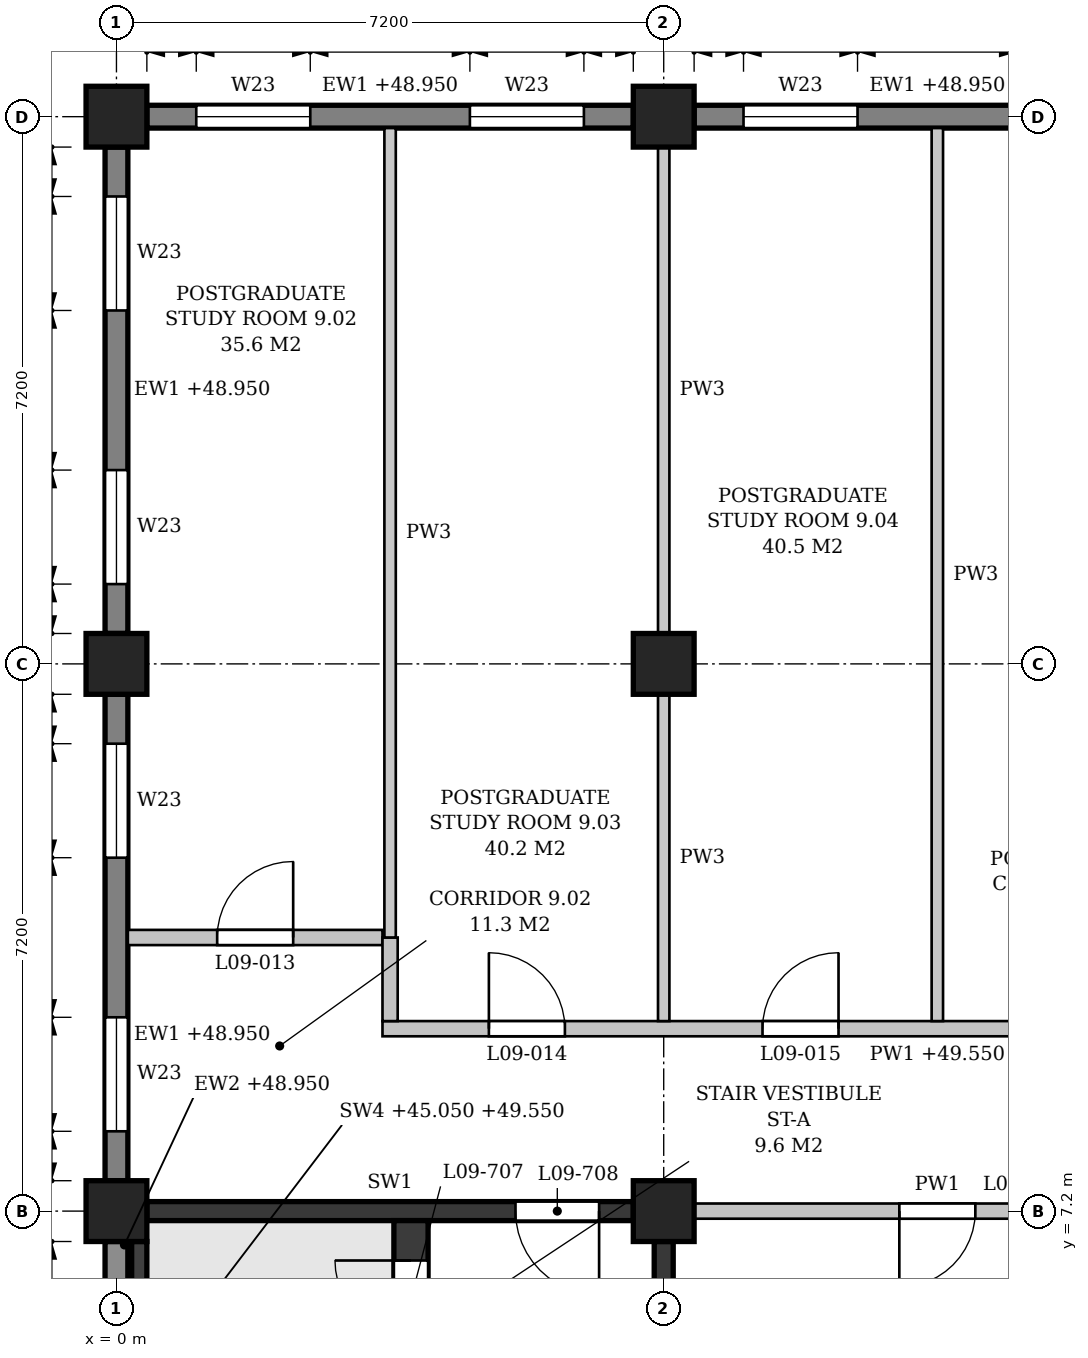
"""IFC4 building model, lengths in metres.
Left out: names, types, materials, properties, quantities, classifications, styles, units other than length and angle.
Written with IfcOpenShell. Run it as: python <this file> out.ifc"""

import sys

from ifc_helpers import new_model, si_unit, direction, frame, frame_2d, origin, origin_2d, place, context, subcontext, project, spatial, polyline, rectangle, outline, extrude, element, fill, save


model = new_model("IFC4")
c1 = context("Model", 3, precision=1e-05, world=origin(), true_north=direction((0.0, 1.0)))
c2 = subcontext(c1, "Body", "Model", "MODEL_VIEW")
j1 = project(units=[si_unit("LENGTHUNIT", "METRE"), si_unit("PLANEANGLEUNIT", "RADIAN")], contexts=[c1])
p1 = place(None, origin())
s1 = spatial("IfcSite", under=j1, at=p1, CompositionType="ELEMENT")
p2 = place(p1, origin())
s2 = spatial("IfcBuilding", under=s1, at=p2, CompositionType="ELEMENT")
p3 = place(p2, frame((0.0, 0.0, 45.3)))
s3 = spatial("IfcBuildingStorey", under=s2, at=p3, CompositionType="ELEMENT", Elevation=45.3)
for number, where, z_axis, x_axis in (
    (1, (0.0, 7.2, 0.0), (0.0, 0.0, 1.0), (1.0, 0.0, 0.0)),
    (2, (0.0, 14.4, 0.0), (0.0, 0.0, 1.0), (1.0, 0.0, 0.0)),
    (3, (0.0, 21.6, 0.0), (0.0, 0.0, 1.0), (1.0, 0.0, 0.0)),
    (4, (7.2, 7.2, 0.0), (0.0, 0.0, 1.0), (1.0, 0.0, 0.0)),
    (5, (7.2, 14.4, 0.0), (0.0, 0.0, 1.0), (1.0, 0.0, 0.0)),
    (6, (7.2, 21.6, 0.0), (0.0, 0.0, 1.0), (1.0, 0.0, 0.0)),
):
    element("IfcColumn", number, at=place(p3, frame(where, z_axis=z_axis, x_axis=x_axis)), inside=s3, PredefinedType="COLUMN", context=c2, shape_type="SweptSolid", body=[
        extrude(rectangle(XDim=0.8, YDim=0.8, at=origin_2d()), origin(), (0.0, 0.0, 1.0), 4.5),
    ])
p4 = place(p3, frame((0.0, 0.4, 0.0), z_axis=(0.0, 0.0, 1.0), x_axis=(0.0, 1.0, 0.0)))
e7 = element("IfcWall", 7, at=p4, inside=s3, PredefinedType="STANDARD", context=c2, shape_type="SweptSolid", body=[
    extrude(rectangle(XDim=6.4, YDim=0.3, at=frame_2d((3.2, 0.0))), origin(), (0.0, 0.0, 1.0), 3.65),
])
p5 = place(p4, frame((0.95, 0.0, 0.9)))
e8 = element("IfcOpeningElement", 8, at=p5, cuts=e7, PredefinedType="OPENING", context=c2, shape_type="SweptSolid", body=[
    extrude(outline(polyline([(0.0, 0.0), (0.9, 0.0), (0.9, 2.25), (0.45, 2.7), (0.0, 2.25), (0.0, 0.0)])), frame((0.0, 0.16, 0.0), z_axis=(0.0, -1.0, 0.0), x_axis=(1.0, 0.0, 0.0)), (0.0, 0.0, 1.0), 0.32),
])
p6 = place(p4, frame((4.55, 0.0, 0.9)))
e9 = element("IfcOpeningElement", 9, at=p6, cuts=e7, PredefinedType="OPENING", context=c2, shape_type="SweptSolid", body=[
    extrude(outline(polyline([(0.0, 0.0), (0.9, 0.0), (0.9, 2.25), (0.45, 2.7), (0.0, 2.25), (0.0, 0.0)])), frame((0.0, 0.16, 0.0), z_axis=(0.0, -1.0, 0.0), x_axis=(1.0, 0.0, 0.0)), (0.0, 0.0, 1.0), 0.32),
])
p7 = place(p3, frame((0.0, 7.6, 0.0), z_axis=(0.0, 0.0, 1.0), x_axis=(0.0, 1.0, 0.0)))
e10 = element("IfcWall", 10, at=p7, inside=s3, PredefinedType="STANDARD", context=c2, shape_type="SweptSolid", body=[
    extrude(rectangle(XDim=6.4, YDim=0.3, at=frame_2d((3.2, 0.0))), origin(), (0.0, 0.0, 1.0), 3.65),
])
p8 = place(p7, frame((0.65, 0.0, 0.9)))
e11 = element("IfcOpeningElement", 11, at=p8, cuts=e10, PredefinedType="OPENING", context=c2, shape_type="SweptSolid", body=[
    extrude(outline(polyline([(0.0, 0.0), (1.5, 0.0), (1.5, 1.95), (0.75, 2.7), (0.0, 1.95), (0.0, 0.0)])), frame((0.0, 0.16, 0.0), z_axis=(0.0, -1.0, 0.0), x_axis=(1.0, 0.0, 0.0)), (0.0, 0.0, 1.0), 0.32),
])
p9 = place(p7, frame((4.25, 0.0, 0.9)))
e12 = element("IfcOpeningElement", 12, at=p9, cuts=e10, PredefinedType="OPENING", context=c2, shape_type="SweptSolid", body=[
    extrude(outline(polyline([(0.0, 0.0), (1.5, 0.0), (1.5, 1.95), (0.75, 2.7), (0.0, 1.95), (0.0, 0.0)])), frame((0.0, 0.16, 0.0), z_axis=(0.0, -1.0, 0.0), x_axis=(1.0, 0.0, 0.0)), (0.0, 0.0, 1.0), 0.32),
])
p10 = place(p3, frame((0.0, 14.8, 0.0), z_axis=(0.0, 0.0, 1.0), x_axis=(0.0, 1.0, 0.0)))
e13 = element("IfcWall", 13, at=p10, inside=s3, PredefinedType="STANDARD", context=c2, shape_type="SweptSolid", body=[
    extrude(rectangle(XDim=6.4, YDim=0.3, at=frame_2d((3.2, 0.0))), origin(), (0.0, 0.0, 1.0), 3.65),
])
p11 = place(p10, frame((0.65, 0.0, 0.9)))
e14 = element("IfcOpeningElement", 14, at=p11, cuts=e13, PredefinedType="OPENING", context=c2, shape_type="SweptSolid", body=[
    extrude(outline(polyline([(0.0, 0.0), (1.5, 0.0), (1.5, 1.95), (0.75, 2.7), (0.0, 1.95), (0.0, 0.0)])), frame((0.0, 0.16, 0.0), z_axis=(0.0, -1.0, 0.0), x_axis=(1.0, 0.0, 0.0)), (0.0, 0.0, 1.0), 0.32),
])
p12 = place(p10, frame((4.25, 0.0, 0.9)))
e15 = element("IfcOpeningElement", 15, at=p12, cuts=e13, PredefinedType="OPENING", context=c2, shape_type="SweptSolid", body=[
    extrude(outline(polyline([(0.0, 0.0), (1.5, 0.0), (1.5, 1.95), (0.75, 2.7), (0.0, 1.95), (0.0, 0.0)])), frame((0.0, 0.16, 0.0), z_axis=(0.0, -1.0, 0.0), x_axis=(1.0, 0.0, 0.0)), (0.0, 0.0, 1.0), 0.32),
])
p13 = place(p3, frame((14.0, 21.6, 0.0), z_axis=(0.0, 0.0, 1.0), x_axis=(-1.0, 0.0, 0.0)))
e16 = element("IfcWall", 16, at=p13, inside=s3, PredefinedType="STANDARD", context=c2, shape_type="SweptSolid", body=[
    extrude(rectangle(XDim=6.4, YDim=0.3, at=frame_2d((3.2, 0.0))), origin(), (0.0, 0.0, 1.0), 3.65),
])
p14 = place(p13, frame((0.65, 0.0, 0.9)))
e17 = element("IfcOpeningElement", 17, at=p14, cuts=e16, PredefinedType="OPENING", context=c2, shape_type="SweptSolid", body=[
    extrude(outline(polyline([(0.0, 0.0), (1.5, 0.0), (1.5, 1.95), (0.75, 2.7), (0.0, 1.95), (0.0, 0.0)])), frame((0.0, 0.16, 0.0), z_axis=(0.0, -1.0, 0.0), x_axis=(1.0, 0.0, 0.0)), (0.0, 0.0, 1.0), 0.32),
])
p15 = place(p13, frame((4.25, 0.0, 0.9)))
e18 = element("IfcOpeningElement", 18, at=p15, cuts=e16, PredefinedType="OPENING", context=c2, shape_type="SweptSolid", body=[
    extrude(outline(polyline([(0.0, 0.0), (1.5, 0.0), (1.5, 1.95), (0.75, 2.7), (0.0, 1.95), (0.0, 0.0)])), frame((0.0, 0.16, 0.0), z_axis=(0.0, -1.0, 0.0), x_axis=(1.0, 0.0, 0.0)), (0.0, 0.0, 1.0), 0.32),
])
p16 = place(p3, frame((6.8, 21.6, 0.0), z_axis=(0.0, 0.0, 1.0), x_axis=(-1.0, 0.0, 0.0)))
e19 = element("IfcWall", 19, at=p16, inside=s3, PredefinedType="STANDARD", context=c2, shape_type="SweptSolid", body=[
    extrude(rectangle(XDim=6.4, YDim=0.3, at=frame_2d((3.2, 0.0))), origin(), (0.0, 0.0, 1.0), 3.65),
])
p17 = place(p16, frame((0.65, 0.0, 0.9)))
e20 = element("IfcOpeningElement", 20, at=p17, cuts=e19, PredefinedType="OPENING", context=c2, shape_type="SweptSolid", body=[
    extrude(outline(polyline([(0.0, 0.0), (1.5, 0.0), (1.5, 1.95), (0.75, 2.7), (0.0, 1.95), (0.0, 0.0)])), frame((0.0, 0.16, 0.0), z_axis=(0.0, -1.0, 0.0), x_axis=(1.0, 0.0, 0.0)), (0.0, 0.0, 1.0), 0.32),
])
p18 = place(p16, frame((4.25, 0.0, 0.9)))
e21 = element("IfcOpeningElement", 21, at=p18, cuts=e19, PredefinedType="OPENING", context=c2, shape_type="SweptSolid", body=[
    extrude(outline(polyline([(0.0, 0.0), (1.5, 0.0), (1.5, 1.95), (0.75, 2.7), (0.0, 1.95), (0.0, 0.0)])), frame((0.0, 0.16, 0.0), z_axis=(0.0, -1.0, 0.0), x_axis=(1.0, 0.0, 0.0)), (0.0, 0.0, 1.0), 0.32),
])
p19 = place(p3, frame((0.4, 7.2, 0.0), z_axis=(0.0, 0.0, 1.0), x_axis=(1.0, 0.0, 0.0)))
e22 = element("IfcWall", 22, at=p19, inside=s3, PredefinedType="SHEAR", context=c2, shape_type="SweptSolid", body=[
    extrude(rectangle(XDim=6.4, YDim=0.25, at=frame_2d((3.2, 0.0))), origin(), (0.0, 0.0, 1.0), 3.55),
])
p20 = place(p19, frame((4.85, 0.0, 0.0)))
e23 = element("IfcOpeningElement", 23, at=p20, cuts=e22, PredefinedType="OPENING", context=c2, shape_type="SweptSolid", body=[
    extrude(rectangle(XDim=1.1, YDim=2.1, at=frame_2d((0.55, 1.05))), frame((0.0, 0.135, 0.0), z_axis=(0.0, -1.0, 0.0), x_axis=(1.0, 0.0, 0.0)), (0.0, 0.0, 1.0), 0.27),
])
p21 = place(p3, frame((7.2, 0.4, 0.0), z_axis=(0.0, 0.0, 1.0), x_axis=(0.0, 1.0, 0.0)))
e24 = element("IfcWall", 24, at=p21, inside=s3, PredefinedType="SHEAR", context=c2, shape_type="SweptSolid", body=[
    extrude(rectangle(XDim=6.4, YDim=0.25, at=frame_2d((3.2, 0.0))), origin(), (0.0, 0.0, 1.0), 3.55),
])
p22 = place(p3, frame((0.3, 5.85, -0.25), z_axis=(0.0, 0.0, 1.0), x_axis=(0.0, 1.0, 0.0)))
e25 = element("IfcWall", 25, at=p22, inside=s3, PredefinedType="SHEAR", context=c2, shape_type="SweptSolid", body=[
    extrude(rectangle(XDim=0.95, YDim=0.2, at=frame_2d((0.475, 0.0))), origin(), (0.0, 0.0, 1.0), 4.5),
])
p23 = place(p3, frame((3.875, 0.15, 0.0), z_axis=(0.0, 0.0, 1.0), x_axis=(0.0, 1.0, 0.0)))
e26 = element("IfcWall", 26, at=p23, inside=s3, PredefinedType="SHEAR", context=c2, shape_type="SweptSolid", body=[
    extrude(rectangle(XDim=6.925, YDim=0.45, at=frame_2d((3.462, 0.0))), origin(), (0.0, 0.0, 1.0), 4.25),
])
p24 = place(p23, frame((5.4, 0.0, 0.0)))
e27 = element("IfcOpeningElement", 27, at=p24, cuts=e26, PredefinedType="OPENING", context=c2, shape_type="SweptSolid", body=[
    extrude(rectangle(XDim=1.0, YDim=2.1, at=frame_2d((0.5, 1.05))), frame((0.0, 0.235, 0.0), z_axis=(0.0, -1.0, 0.0), x_axis=(1.0, 0.0, 0.0)), (0.0, 0.0, 1.0), 0.47),
])
p25 = place(p3, frame((7.6, 7.2, 0.0), z_axis=(0.0, 0.0, 1.0), x_axis=(1.0, 0.0, 0.0)))
e28 = element("IfcWall", 28, at=p25, inside=s3, PredefinedType="PARTITIONING", context=c2, shape_type="SweptSolid", body=[
    extrude(rectangle(XDim=6.4, YDim=0.2, at=frame_2d((3.2, 0.0))), origin(), (0.0, 0.0, 1.0), 3.55),
])
p26 = place(p25, frame((2.7, 0.0, 0.0)))
e29 = element("IfcOpeningElement", 29, at=p26, cuts=e28, PredefinedType="OPENING", context=c2, shape_type="SweptSolid", body=[
    extrude(rectangle(XDim=1.0, YDim=2.1, at=frame_2d((0.5, 1.05))), frame((0.0, 0.11, 0.0), z_axis=(0.0, -1.0, 0.0), x_axis=(1.0, 0.0, 0.0)), (0.0, 0.0, 1.0), 0.22),
])
p27 = place(p3, frame((3.5, 9.6, 0.0), z_axis=(0.0, 0.0, 1.0), x_axis=(1.0, 0.0, 0.0)))
e30 = element("IfcWall", 30, at=p27, inside=s3, PredefinedType="PARTITIONING", context=c2, shape_type="SweptSolid", body=[
    extrude(outline(polyline([(0.0, 0.0), (14.6, 0.0), (14.6, 4.25), (11.125, 4.25), (11.125, 3.55), (10.675, 3.55), (10.675, 4.25), (3.925, 4.25), (3.925, 3.55), (3.475, 3.55), (3.475, 4.25), (0.0, 4.25), (0.0, 0.0)])), frame((0.0, 0.1, 0.0), z_axis=(0.0, -1.0, 0.0), x_axis=(1.0, 0.0, 0.0)), (0.0, 0.0, 1.0), 0.2),
])
p28 = place(p27, frame((1.4, 0.0, 0.0)))
e31 = element("IfcOpeningElement", 31, at=p28, cuts=e30, PredefinedType="OPENING", context=c2, shape_type="SweptSolid", body=[
    extrude(rectangle(XDim=1.0, YDim=2.1, at=frame_2d((0.5, 1.05))), frame((0.0, 0.11, 0.0), z_axis=(0.0, -1.0, 0.0), x_axis=(1.0, 0.0, 0.0)), (0.0, 0.0, 1.0), 0.22),
])
p29 = place(p27, frame((5.0, 0.0, 0.0)))
e32 = element("IfcOpeningElement", 32, at=p29, cuts=e30, PredefinedType="OPENING", context=c2, shape_type="SweptSolid", body=[
    extrude(rectangle(XDim=1.0, YDim=2.1, at=frame_2d((0.5, 1.05))), frame((0.0, 0.11, 0.0), z_axis=(0.0, -1.0, 0.0), x_axis=(1.0, 0.0, 0.0)), (0.0, 0.0, 1.0), 0.22),
])
p30 = place(p3, frame((0.15, 10.8, 0.0), z_axis=(0.0, 0.0, 1.0), x_axis=(1.0, 0.0, 0.0)))
e33 = element("IfcWall", 33, at=p30, inside=s3, PredefinedType="PARTITIONING", context=c2, shape_type="SweptSolid", body=[
    extrude(outline(polyline([(0.0, 0.0), (3.35, 0.0), (3.35, 4.25), (0.05, 4.25), (0.05, 3.65), (0.0, 3.65), (0.0, 0.0)])), frame((0.0, 0.1, 0.0), z_axis=(0.0, -1.0, 0.0), x_axis=(1.0, 0.0, 0.0)), (0.0, 0.0, 1.0), 0.2),
])
p31 = place(p30, frame((1.175, 0.0, 0.0)))
e34 = element("IfcOpeningElement", 34, at=p31, cuts=e33, PredefinedType="OPENING", context=c2, shape_type="SweptSolid", body=[
    extrude(rectangle(XDim=1.0, YDim=2.1, at=frame_2d((0.5, 1.05))), frame((0.0, 0.11, 0.0), z_axis=(0.0, -1.0, 0.0), x_axis=(1.0, 0.0, 0.0)), (0.0, 0.0, 1.0), 0.22),
])
p32 = place(p3, frame((3.6, 9.7, 0.0), z_axis=(0.0, 0.0, 1.0), x_axis=(0.0, 1.0, 0.0)))
e35 = element("IfcWall", 35, at=p32, inside=s3, PredefinedType="PARTITIONING", context=c2, shape_type="SweptSolid", body=[
    extrude(rectangle(XDim=1.1, YDim=0.2, at=frame_2d((0.55, 0.0))), origin(), (0.0, 0.0, 1.0), 4.25),
])
p33 = place(p3, frame((3.6, 10.8, 0.0), z_axis=(0.0, 0.0, 1.0), x_axis=(0.0, 1.0, 0.0)))
e36 = element("IfcWall", 36, at=p33, inside=s3, PredefinedType="PARTITIONING", context=c2, shape_type="SweptSolid", body=[
    extrude(rectangle(XDim=10.65, YDim=0.15, at=frame_2d((5.325, 0.0))), origin(), (0.0, 0.0, 1.0), 3.55),
])
p34 = place(p3, frame((7.2, 9.7, 0.0), z_axis=(0.0, 0.0, 1.0), x_axis=(0.0, 1.0, 0.0)))
e37 = element("IfcWall", 37, at=p34, inside=s3, PredefinedType="PARTITIONING", context=c2, shape_type="SweptSolid", body=[
    extrude(rectangle(XDim=4.3, YDim=0.15, at=frame_2d((2.15, 0.0))), origin(), (0.0, 0.0, 1.0), 3.55),
])
p35 = place(p3, frame((7.2, 14.8, 0.0), z_axis=(0.0, 0.0, 1.0), x_axis=(0.0, 1.0, 0.0)))
e38 = element("IfcWall", 38, at=p35, inside=s3, PredefinedType="PARTITIONING", context=c2, shape_type="SweptSolid", body=[
    extrude(rectangle(XDim=6.4, YDim=0.15, at=frame_2d((3.2, 0.0))), origin(), (0.0, 0.0, 1.0), 3.55),
])
p36 = place(p3, frame((10.8, 9.7, 0.0), z_axis=(0.0, 0.0, 1.0), x_axis=(0.0, 1.0, 0.0)))
e39 = element("IfcWall", 39, at=p36, inside=s3, PredefinedType="PARTITIONING", context=c2, shape_type="SweptSolid", body=[
    extrude(rectangle(XDim=11.75, YDim=0.15, at=frame_2d((5.875, 0.0))), origin(), (0.0, 0.0, 1.0), 3.55),
])
p37 = place(p15, origin())
e40 = element("IfcWindow", 40, at=p37, inside=s3, PartitioningType="SINGLE_PANEL", PredefinedType="WINDOW", context=c2, shape_type="SweptSolid", body=[
    extrude(outline(polyline([(0.0, 0.0), (1.5, 0.0), (1.5, 1.95), (0.75, 2.7), (0.0, 1.95), (0.0, 0.0)])), frame((0.0, 0.03, 0.0), z_axis=(0.0, -1.0, 0.0), x_axis=(1.0, 0.0, 0.0)), (0.0, 0.0, 1.0), 0.06),
])
fill(e18, e40)
p38 = place(p17, origin())
e41 = element("IfcWindow", 41, at=p38, inside=s3, PartitioningType="SINGLE_PANEL", PredefinedType="WINDOW", context=c2, shape_type="SweptSolid", body=[
    extrude(outline(polyline([(0.0, 0.0), (1.5, 0.0), (1.5, 1.95), (0.75, 2.7), (0.0, 1.95), (0.0, 0.0)])), frame((0.0, 0.03, 0.0), z_axis=(0.0, -1.0, 0.0), x_axis=(1.0, 0.0, 0.0)), (0.0, 0.0, 1.0), 0.06),
])
fill(e20, e41)
p39 = place(p18, origin())
e42 = element("IfcWindow", 42, at=p39, inside=s3, PartitioningType="SINGLE_PANEL", PredefinedType="WINDOW", context=c2, shape_type="SweptSolid", body=[
    extrude(outline(polyline([(0.0, 0.0), (1.5, 0.0), (1.5, 1.95), (0.75, 2.7), (0.0, 1.95), (0.0, 0.0)])), frame((0.0, 0.03, 0.0), z_axis=(0.0, -1.0, 0.0), x_axis=(1.0, 0.0, 0.0)), (0.0, 0.0, 1.0), 0.06),
])
fill(e21, e42)
p40 = place(p8, origin())
e43 = element("IfcWindow", 43, at=p40, inside=s3, PartitioningType="SINGLE_PANEL", PredefinedType="WINDOW", context=c2, shape_type="SweptSolid", body=[
    extrude(outline(polyline([(0.0, 0.0), (1.5, 0.0), (1.5, 1.95), (0.75, 2.7), (0.0, 1.95), (0.0, 0.0)])), frame((0.0, 0.03, 0.0), z_axis=(0.0, -1.0, 0.0), x_axis=(1.0, 0.0, 0.0)), (0.0, 0.0, 1.0), 0.06),
])
fill(e11, e43)
p41 = place(p9, origin())
e44 = element("IfcWindow", 44, at=p41, inside=s3, PartitioningType="SINGLE_PANEL", PredefinedType="WINDOW", context=c2, shape_type="SweptSolid", body=[
    extrude(outline(polyline([(0.0, 0.0), (1.5, 0.0), (1.5, 1.95), (0.75, 2.7), (0.0, 1.95), (0.0, 0.0)])), frame((0.0, 0.03, 0.0), z_axis=(0.0, -1.0, 0.0), x_axis=(1.0, 0.0, 0.0)), (0.0, 0.0, 1.0), 0.06),
])
fill(e12, e44)
p42 = place(p11, origin())
e45 = element("IfcWindow", 45, at=p42, inside=s3, PartitioningType="SINGLE_PANEL", PredefinedType="WINDOW", context=c2, shape_type="SweptSolid", body=[
    extrude(outline(polyline([(0.0, 0.0), (1.5, 0.0), (1.5, 1.95), (0.75, 2.7), (0.0, 1.95), (0.0, 0.0)])), frame((0.0, 0.03, 0.0), z_axis=(0.0, -1.0, 0.0), x_axis=(1.0, 0.0, 0.0)), (0.0, 0.0, 1.0), 0.06),
])
fill(e14, e45)
p43 = place(p12, origin())
e46 = element("IfcWindow", 46, at=p43, inside=s3, PartitioningType="SINGLE_PANEL", PredefinedType="WINDOW", context=c2, shape_type="SweptSolid", body=[
    extrude(outline(polyline([(0.0, 0.0), (1.5, 0.0), (1.5, 1.95), (0.75, 2.7), (0.0, 1.95), (0.0, 0.0)])), frame((0.0, 0.03, 0.0), z_axis=(0.0, -1.0, 0.0), x_axis=(1.0, 0.0, 0.0)), (0.0, 0.0, 1.0), 0.06),
])
fill(e15, e46)
p44 = place(p24, origin())
e47 = element("IfcDoor", 47, at=p44, inside=s3, OperationType="SINGLE_SWING_RIGHT", PredefinedType="DOOR", context=c2, shape_type="SweptSolid", body=[
    extrude(rectangle(XDim=1.0, YDim=2.1, at=frame_2d((0.5, 1.05))), frame((0.0, 0.025, 0.0), z_axis=(0.0, -1.0, 0.0), x_axis=(1.0, 0.0, 0.0)), (0.0, 0.0, 1.0), 0.05),
])
fill(e27, e47)
p45 = place(p20, frame((1.1, 0.0, 0.0), z_axis=(0.0, 0.0, 1.0), x_axis=(-1.0, 0.0, 0.0)))
e48 = element("IfcDoor", 48, at=p45, inside=s3, OperationType="SINGLE_SWING_LEFT", PredefinedType="DOOR", context=c2, shape_type="SweptSolid", body=[
    extrude(rectangle(XDim=1.1, YDim=2.1, at=frame_2d((0.55, 1.05))), frame((0.0, 0.025, 0.0), z_axis=(0.0, -1.0, 0.0), x_axis=(1.0, 0.0, 0.0)), (0.0, 0.0, 1.0), 0.05),
])
fill(e23, e48)
p46 = place(p26, frame((1.0, 0.0, 0.0), z_axis=(0.0, 0.0, 1.0), x_axis=(-1.0, 0.0, 0.0)))
e49 = element("IfcDoor", 49, at=p46, inside=s3, OperationType="SINGLE_SWING_RIGHT", PredefinedType="DOOR", context=c2, shape_type="SweptSolid", body=[
    extrude(rectangle(XDim=1.0, YDim=2.1, at=frame_2d((0.5, 1.05))), frame((0.0, 0.025, 0.0), z_axis=(0.0, -1.0, 0.0), x_axis=(1.0, 0.0, 0.0)), (0.0, 0.0, 1.0), 0.05),
])
fill(e29, e49)
p47 = place(p31, origin())
e50 = element("IfcDoor", 50, at=p47, inside=s3, OperationType="SINGLE_SWING_RIGHT", PredefinedType="DOOR", context=c2, shape_type="SweptSolid", body=[
    extrude(rectangle(XDim=1.0, YDim=2.1, at=frame_2d((0.5, 1.05))), frame((0.0, 0.025, 0.0), z_axis=(0.0, -1.0, 0.0), x_axis=(1.0, 0.0, 0.0)), (0.0, 0.0, 1.0), 0.05),
])
fill(e34, e50)
p48 = place(p28, origin())
e51 = element("IfcDoor", 51, at=p48, inside=s3, OperationType="SINGLE_SWING_LEFT", PredefinedType="DOOR", context=c2, shape_type="SweptSolid", body=[
    extrude(rectangle(XDim=1.0, YDim=2.1, at=frame_2d((0.5, 1.05))), frame((0.0, 0.025, 0.0), z_axis=(0.0, -1.0, 0.0), x_axis=(1.0, 0.0, 0.0)), (0.0, 0.0, 1.0), 0.05),
])
fill(e31, e51)
p49 = place(p29, origin())
e52 = element("IfcDoor", 52, at=p49, inside=s3, OperationType="SINGLE_SWING_RIGHT", PredefinedType="DOOR", context=c2, shape_type="SweptSolid", body=[
    extrude(rectangle(XDim=1.0, YDim=2.1, at=frame_2d((0.5, 1.05))), frame((0.0, 0.025, 0.0), z_axis=(0.0, -1.0, 0.0), x_axis=(1.0, 0.0, 0.0)), (0.0, 0.0, 1.0), 0.05),
])
fill(e32, e52)
save(model, sys.argv[1])
